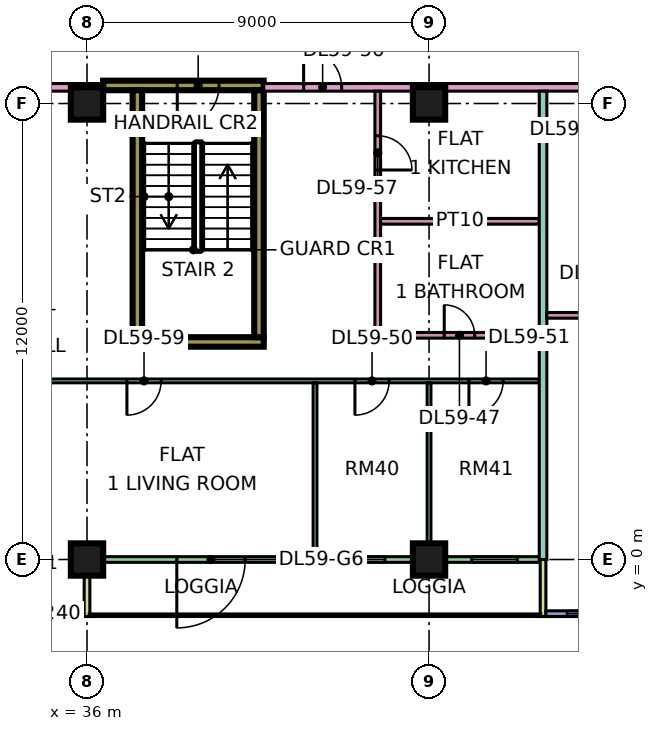
"""IFC4 building model, lengths in metres.
Left out: names, types, materials, properties, quantities, classifications, styles, units other than length and angle.
Written with IfcOpenShell. Run it as: python <this file> out.ifc"""

import sys

from ifc_helpers import new_model, si_unit, direction, frame, frame_2d, origin, origin_2d, place, context, subcontext, project, spatial, rectangle, extrude, element, fill, save


model = new_model("IFC4")
c1 = context("Model", 3, precision=1e-05, world=origin(), true_north=direction((0.0, 1.0)))
c2 = subcontext(c1, "Body", "Model", "MODEL_VIEW")
j1 = project(units=[si_unit("LENGTHUNIT", "METRE"), si_unit("PLANEANGLEUNIT", "RADIAN")], contexts=[c1])
p1 = place(None, origin())
s1 = spatial("IfcSite", under=j1, at=p1, CompositionType="ELEMENT")
p2 = place(p1, origin())
s2 = spatial("IfcBuilding", under=s1, at=p2, CompositionType="ELEMENT")
p3 = place(p2, frame((0.0, 0.0, 249.15)))
s3 = spatial("IfcBuildingStorey", under=s2, at=p3, CompositionType="ELEMENT", Elevation=249.15)
for number, where, z_axis, x_axis in (
    (1, (36.0, 0.0, 0.0), (0.0, 0.0, 1.0), (1.0, 0.0, 0.0)),
    (2, (36.0, 12.0, 0.0), (0.0, 0.0, 1.0), (1.0, 0.0, 0.0)),
    (3, (45.0, 0.0, 0.0), (0.0, 0.0, 1.0), (1.0, 0.0, 0.0)),
    (4, (45.0, 12.0, 0.0), (0.0, 0.0, 1.0), (1.0, 0.0, 0.0)),
):
    element("IfcColumn", number, at=place(p3, frame(where, z_axis=z_axis, x_axis=x_axis)), inside=s3, PredefinedType="COLUMN", context=c2, shape_type="SweptSolid", body=[
        extrude(rectangle(XDim=0.85, YDim=0.85, at=origin_2d()), origin(), (0.0, 0.0, 1.0), 3.75),
    ])
p4 = place(p3, frame((37.2, 5.725, 0.0), z_axis=(0.0, 0.0, 1.0), x_axis=(1.0, 0.0, 0.0)))
e5 = element("IfcWall", 5, at=p4, inside=s3, PredefinedType="SHEAR", context=c2, shape_type="SweptSolid", body=[
    extrude(rectangle(XDim=3.45, YDim=0.25, at=frame_2d((1.725, 0.0))), origin(), (0.0, 0.0, 1.0), 3.75),
])
p5 = place(p3, frame((36.425, 12.475, 0.0), z_axis=(0.0, 0.0, 1.0), x_axis=(1.0, 0.0, 0.0)))
e6 = element("IfcWall", 6, at=p5, inside=s3, PredefinedType="SHEAR", context=c2, shape_type="SweptSolid", body=[
    extrude(rectangle(XDim=4.225, YDim=0.25, at=frame_2d((2.112, 0.0))), origin(), (0.0, 0.0, 1.0), 3.75),
])
p6 = place(p5, frame((1.95, 0.0, 0.0)))
e7 = element("IfcOpeningElement", 7, at=p6, cuts=e6, PredefinedType="OPENING", context=c2, shape_type="SweptSolid", body=[
    extrude(rectangle(XDim=1.1, YDim=2.2, at=frame_2d((0.55, 1.1))), frame((0.0, 0.135, 0.0), z_axis=(0.0, -1.0, 0.0), x_axis=(1.0, 0.0, 0.0)), (0.0, 0.0, 1.0), 0.27),
])
for number, where, z_axis, x_axis in (
    (8, (37.325, 5.85, 0.0), (0.0, 0.0, 1.0), (0.0, 1.0, 0.0)),
    (9, (40.525, 5.85, 0.0), (0.0, 0.0, 1.0), (0.0, 1.0, 0.0)),
):
    element("IfcWall", number, at=place(p3, frame(where, z_axis=z_axis, x_axis=x_axis)), inside=s3, PredefinedType="SHEAR", context=c2, shape_type="SweptSolid", body=[
        extrude(rectangle(XDim=6.5, YDim=0.25, at=frame_2d((3.25, 0.0))), origin(), (0.0, 0.0, 1.0), 3.75),
    ])
p7 = place(p3, frame((24.075, -1.425, 0.0), z_axis=(0.0, 0.0, 1.0), x_axis=(1.0, 0.0, 0.0)))
e10 = element("IfcWall", 10, at=p7, inside=s3, PredefinedType="SOLIDWALL", context=c2, shape_type="SweptSolid", body=[
    extrude(rectangle(XDim=11.85, YDim=0.15, at=frame_2d((5.925, 0.0))), origin(), (0.0, 0.0, 1.0), 3.35),
])
p8 = place(p7, frame((1.462, 0.0, 0.45)))
e11 = element("IfcOpeningElement", 11, at=p8, cuts=e10, PredefinedType="OPENING", context=c2, shape_type="SweptSolid", body=[
    extrude(rectangle(XDim=3.0, YDim=2.4, at=frame_2d((1.5, 1.2))), frame((0.0, 0.085, 0.0), z_axis=(0.0, -1.0, 0.0), x_axis=(1.0, 0.0, 0.0)), (0.0, 0.0, 1.0), 0.17),
])
p9 = place(p7, frame((6.525, 0.0, 0.45)))
e12 = element("IfcOpeningElement", 12, at=p9, cuts=e10, PredefinedType="OPENING", context=c2, shape_type="SweptSolid", body=[
    extrude(rectangle(XDim=1.8, YDim=2.4, at=frame_2d((0.9, 1.2))), frame((0.0, 0.085, 0.0), z_axis=(0.0, -1.0, 0.0), x_axis=(1.0, 0.0, 0.0)), (0.0, 0.0, 1.0), 0.17),
])
p10 = place(p7, frame((9.488, 0.0, 0.45)))
e13 = element("IfcOpeningElement", 13, at=p10, cuts=e10, PredefinedType="OPENING", context=c2, shape_type="SweptSolid", body=[
    extrude(rectangle(XDim=1.8, YDim=2.4, at=frame_2d((0.9, 1.2))), frame((0.0, 0.085, 0.0), z_axis=(0.0, -1.0, 0.0), x_axis=(1.0, 0.0, 0.0)), (0.0, 0.0, 1.0), 0.17),
])
p11 = place(p3, frame((36.075, 0.0, 0.0), z_axis=(0.0, 0.0, 1.0), x_axis=(1.0, 0.0, 0.0)))
e14 = element("IfcWall", 14, at=p11, inside=s3, PredefinedType="SOLIDWALL", context=c2, shape_type="SweptSolid", body=[
    extrude(rectangle(XDim=11.85, YDim=0.15, at=frame_2d((5.925, 0.0))), origin(), (0.0, 0.0, 1.0), 3.35),
])
p12 = place(p11, frame((2.288, 0.0, 0.0)))
e15 = element("IfcOpeningElement", 15, at=p12, cuts=e14, PredefinedType="OPENING", context=c2, shape_type="SweptSolid", body=[
    extrude(rectangle(XDim=1.8, YDim=2.4, at=frame_2d((0.9, 1.2))), frame((0.0, 0.085, 0.0), z_axis=(0.0, -1.0, 0.0), x_axis=(1.0, 0.0, 0.0)), (0.0, 0.0, 1.0), 0.17),
])
p13 = place(p11, frame((6.562, 0.0, 0.45)))
e16 = element("IfcOpeningElement", 16, at=p13, cuts=e14, PredefinedType="OPENING", context=c2, shape_type="SweptSolid", body=[
    extrude(rectangle(XDim=1.2, YDim=2.4, at=frame_2d((0.6, 1.2))), frame((0.0, 0.085, 0.0), z_axis=(0.0, -1.0, 0.0), x_axis=(1.0, 0.0, 0.0)), (0.0, 0.0, 1.0), 0.17),
])
p14 = place(p11, frame((10.05, 0.0, 0.45)))
e17 = element("IfcOpeningElement", 17, at=p14, cuts=e14, PredefinedType="OPENING", context=c2, shape_type="SweptSolid", body=[
    extrude(rectangle(XDim=1.2, YDim=2.4, at=frame_2d((0.6, 1.2))), frame((0.0, 0.085, 0.0), z_axis=(0.0, -1.0, 0.0), x_axis=(1.0, 0.0, 0.0)), (0.0, 0.0, 1.0), 0.17),
])
for number, where, z_axis, x_axis in (
    (18, (36.0, -1.5, 0.0), (0.0, 0.0, 1.0), (0.0, 1.0, 0.0)),
    (19, (48.0, -1.5, 0.0), (0.0, 0.0, 1.0), (0.0, 1.0, 0.0)),
):
    element("IfcWall", number, at=place(p3, frame(where, z_axis=z_axis, x_axis=x_axis)), inside=s3, PredefinedType="SOLIDWALL", context=c2, shape_type="SweptSolid", body=[
        extrude(rectangle(XDim=1.5, YDim=0.15, at=frame_2d((0.75, 0.0))), origin(), (0.0, 0.0, 1.0), 3.35),
    ])
p15 = place(p3, frame((48.075, -1.425, 0.0), z_axis=(0.0, 0.0, 1.0), x_axis=(1.0, 0.0, 0.0)))
e20 = element("IfcWall", 20, at=p15, inside=s3, PredefinedType="SOLIDWALL", context=c2, shape_type="SweptSolid", body=[
    extrude(rectangle(XDim=13.425, YDim=0.15, at=frame_2d((6.712, 0.0))), origin(), (0.0, 0.0, 1.0), 3.35),
])
p16 = place(p15, frame((0.562, 0.0, 0.45)))
e21 = element("IfcOpeningElement", 21, at=p16, cuts=e20, PredefinedType="OPENING", context=c2, shape_type="SweptSolid", body=[
    extrude(rectangle(XDim=1.8, YDim=2.4, at=frame_2d((0.9, 1.2))), frame((0.0, 0.085, 0.0), z_axis=(0.0, -1.0, 0.0), x_axis=(1.0, 0.0, 0.0)), (0.0, 0.0, 1.0), 0.17),
])
p17 = place(p15, frame((4.425, 0.0, 0.45)))
e22 = element("IfcOpeningElement", 22, at=p17, cuts=e20, PredefinedType="OPENING", context=c2, shape_type="SweptSolid", body=[
    extrude(rectangle(XDim=3.0, YDim=2.4, at=frame_2d((1.5, 1.2))), frame((0.0, 0.085, 0.0), z_axis=(0.0, -1.0, 0.0), x_axis=(1.0, 0.0, 0.0)), (0.0, 0.0, 1.0), 0.17),
])
p18 = place(p15, frame((9.375, 0.0, 0.45)))
e23 = element("IfcOpeningElement", 23, at=p18, cuts=e20, PredefinedType="OPENING", context=c2, shape_type="SweptSolid", body=[
    extrude(rectangle(XDim=3.6, YDim=2.4, at=frame_2d((1.8, 1.2))), frame((0.0, 0.085, 0.0), z_axis=(0.0, -1.0, 0.0), x_axis=(1.0, 0.0, 0.0)), (0.0, 0.0, 1.0), 0.17),
])
p19 = place(p3, frame((33.05, 4.7, 0.0), z_axis=(0.0, 0.0, 1.0), x_axis=(1.0, 0.0, 0.0)))
e24 = element("IfcWall", 24, at=p19, inside=s3, PredefinedType="PARTITIONING", context=c2, shape_type="SweptSolid", body=[
    extrude(rectangle(XDim=14.85, YDim=0.1, at=frame_2d((7.425, 0.0))), origin(), (0.0, 0.0, 1.0), 3.35),
])
p20 = place(p19, frame((10.0, 0.0, 0.0)))
e25 = element("IfcOpeningElement", 25, at=p20, cuts=e24, PredefinedType="OPENING", context=c2, shape_type="SweptSolid", body=[
    extrude(rectangle(XDim=0.9, YDim=2.1, at=frame_2d((0.45, 1.05))), frame((0.0, 0.06, 0.0), z_axis=(0.0, -1.0, 0.0), x_axis=(1.0, 0.0, 0.0)), (0.0, 0.0, 1.0), 0.12),
])
p21 = place(p19, frame((13.0, 0.0, 0.0)))
e26 = element("IfcOpeningElement", 26, at=p21, cuts=e24, PredefinedType="OPENING", context=c2, shape_type="SweptSolid", body=[
    extrude(rectangle(XDim=0.9, YDim=2.1, at=frame_2d((0.45, 1.05))), frame((0.0, 0.06, 0.0), z_axis=(0.0, -1.0, 0.0), x_axis=(1.0, 0.0, 0.0)), (0.0, 0.0, 1.0), 0.12),
])
p22 = place(p19, frame((4.0, 0.0, 0.0)))
e27 = element("IfcOpeningElement", 27, at=p22, cuts=e24, PredefinedType="OPENING", context=c2, shape_type="SweptSolid", body=[
    extrude(rectangle(XDim=0.9, YDim=2.1, at=frame_2d((0.45, 1.05))), frame((0.0, 0.06, 0.0), z_axis=(0.0, -1.0, 0.0), x_axis=(1.0, 0.0, 0.0)), (0.0, 0.0, 1.0), 0.12),
])
p23 = place(p3, frame((34.0, 12.425, 0.0), z_axis=(0.0, 0.0, 1.0), x_axis=(1.0, 0.0, 0.0)))
e28 = element("IfcWall", 28, at=p23, inside=s3, PredefinedType="PARTITIONING", context=c2, shape_type="SweptSolid", body=[
    extrude(rectangle(XDim=2.426, YDim=0.2, at=frame_2d((1.213, 0.0))), origin(), (0.0, 0.0, 1.0), 3.35),
])
p24 = place(p3, frame((40.65, 12.425, 0.0), z_axis=(0.0, 0.0, 1.0), x_axis=(1.0, 0.0, 0.0)))
e29 = element("IfcWall", 29, at=p24, inside=s3, PredefinedType="PARTITIONING", context=c2, shape_type="SweptSolid", body=[
    extrude(rectangle(XDim=22.276, YDim=0.2, at=frame_2d((11.138, 0.0))), origin(), (0.0, 0.0, 1.0), 3.35),
])
p25 = place(p24, frame((8.7, 0.0, 0.0)))
e30 = element("IfcOpeningElement", 30, at=p25, cuts=e29, PredefinedType="OPENING", context=c2, shape_type="SweptSolid", body=[
    extrude(rectangle(XDim=1.0, YDim=2.1, at=frame_2d((0.5, 1.05))), frame((0.0, 0.11, 0.0), z_axis=(0.0, -1.0, 0.0), x_axis=(1.0, 0.0, 0.0)), (0.0, 0.0, 1.0), 0.22),
])
p26 = place(p24, frame((1.05, 0.0, 0.0)))
e31 = element("IfcOpeningElement", 31, at=p26, cuts=e29, PredefinedType="OPENING", context=c2, shape_type="SweptSolid", body=[
    extrude(rectangle(XDim=1.0, YDim=2.1, at=frame_2d((0.5, 1.05))), frame((0.0, 0.11, 0.0), z_axis=(0.0, -1.0, 0.0), x_axis=(1.0, 0.0, 0.0)), (0.0, 0.0, 1.0), 0.22),
])
p27 = place(p3, frame((42.0, 0.074, 0.0), z_axis=(0.0, 0.0, 1.0), x_axis=(0.0, 1.0, 0.0)))
e32 = element("IfcWall", 32, at=p27, inside=s3, PredefinedType="PARTITIONING", context=c2, shape_type="SweptSolid", body=[
    extrude(rectangle(XDim=4.576, YDim=0.1, at=frame_2d((2.288, 0.0))), origin(), (0.0, 0.0, 1.0), 3.35),
])
p28 = place(p3, frame((43.65, 5.825, 0.0), z_axis=(0.0, 0.0, 1.0), x_axis=(0.0, 1.0, 0.0)))
e33 = element("IfcWall", 33, at=p28, inside=s3, PredefinedType="PARTITIONING", context=c2, shape_type="SweptSolid", body=[
    extrude(rectangle(XDim=6.5, YDim=0.15, at=frame_2d((3.25, 0.0))), origin(), (0.0, 0.0, 1.0), 3.35),
])
p29 = place(p28, frame((4.425, 0.0, 0.0)))
e34 = element("IfcOpeningElement", 34, at=p29, cuts=e33, PredefinedType="OPENING", context=c2, shape_type="SweptSolid", body=[
    extrude(rectangle(XDim=0.9, YDim=2.1, at=frame_2d((0.45, 1.05))), frame((0.0, 0.085, 0.0), z_axis=(0.0, -1.0, 0.0), x_axis=(1.0, 0.0, 0.0)), (0.0, 0.0, 1.0), 0.17),
])
p30 = place(p3, frame((43.725, 5.9, 0.0), z_axis=(0.0, 0.0, 1.0), x_axis=(1.0, 0.0, 0.0)))
e35 = element("IfcWall", 35, at=p30, inside=s3, PredefinedType="PARTITIONING", context=c2, shape_type="SweptSolid", body=[
    extrude(rectangle(XDim=4.175, YDim=0.15, at=frame_2d((2.087, 0.0))), origin(), (0.0, 0.0, 1.0), 3.35),
])
p31 = place(p30, frame((1.675, 0.0, 0.0)))
e36 = element("IfcOpeningElement", 36, at=p31, cuts=e35, PredefinedType="OPENING", context=c2, shape_type="SweptSolid", body=[
    extrude(rectangle(XDim=0.8, YDim=2.1, at=frame_2d((0.4, 1.05))), frame((0.0, 0.085, 0.0), z_axis=(0.0, -1.0, 0.0), x_axis=(1.0, 0.0, 0.0)), (0.0, 0.0, 1.0), 0.17),
])
p32 = place(p3, frame((43.725, 8.9, 0.0), z_axis=(0.0, 0.0, 1.0), x_axis=(1.0, 0.0, 0.0)))
e37 = element("IfcWall", 37, at=p32, inside=s3, PredefinedType="PARTITIONING", context=c2, shape_type="SweptSolid", body=[
    extrude(rectangle(XDim=4.175, YDim=0.15, at=frame_2d((2.087, 0.0))), origin(), (0.0, 0.0, 1.0), 3.35),
])
p33 = place(p3, frame((45.0, 0.074, 0.0), z_axis=(0.0, 0.0, 1.0), x_axis=(0.0, 1.0, 0.0)))
e38 = element("IfcWall", 38, at=p33, inside=s3, PredefinedType="PARTITIONING", context=c2, shape_type="SweptSolid", body=[
    extrude(rectangle(XDim=4.576, YDim=0.1, at=frame_2d((2.288, 0.0))), origin(), (0.0, 0.0, 1.0), 3.35),
])
p34 = place(p3, frame((48.0, 0.0, 0.0), z_axis=(0.0, 0.0, 1.0), x_axis=(0.0, 1.0, 0.0)))
e39 = element("IfcWall", 39, at=p34, inside=s3, PredefinedType="PARTITIONING", context=c2, shape_type="SweptSolid", body=[
    extrude(rectangle(XDim=12.325, YDim=0.2, at=frame_2d((6.163, 0.0))), origin(), (0.0, 0.0, 1.0), 3.35),
])
p35 = place(p3, frame((48.1, 6.425, 0.0), z_axis=(0.0, 0.0, 1.0), x_axis=(1.0, 0.0, 0.0)))
e40 = element("IfcWall", 40, at=p35, inside=s3, PredefinedType="PARTITIONING", context=c2, shape_type="SweptSolid", body=[
    extrude(rectangle(XDim=8.95, YDim=0.15, at=frame_2d((4.475, 0.0))), origin(), (0.0, 0.0, 1.0), 3.35),
])
p36 = place(p35, frame((0.95, 0.0, 0.0)))
e41 = element("IfcOpeningElement", 41, at=p36, cuts=e40, PredefinedType="OPENING", context=c2, shape_type="SweptSolid", body=[
    extrude(rectangle(XDim=0.9, YDim=2.1, at=frame_2d((0.45, 1.05))), frame((0.0, 0.085, 0.0), z_axis=(0.0, -1.0, 0.0), x_axis=(1.0, 0.0, 0.0)), (0.0, 0.0, 1.0), 0.17),
])
p37 = place(p35, frame((6.95, 0.0, 0.0)))
e42 = element("IfcOpeningElement", 42, at=p37, cuts=e40, PredefinedType="OPENING", context=c2, shape_type="SweptSolid", body=[
    extrude(rectangle(XDim=0.9, YDim=2.1, at=frame_2d((0.45, 1.05))), frame((0.0, 0.085, 0.0), z_axis=(0.0, -1.0, 0.0), x_axis=(1.0, 0.0, 0.0)), (0.0, 0.0, 1.0), 0.17),
])
p38 = place(p10, origin())
e43 = element("IfcWindow", 43, at=p38, inside=s3, PartitioningType="SINGLE_PANEL", PredefinedType="WINDOW", context=c2, shape_type="SweptSolid", body=[
    extrude(rectangle(XDim=1.8, YDim=2.4, at=frame_2d((0.9, 1.2))), frame((0.0, 0.03, 0.0), z_axis=(0.0, -1.0, 0.0), x_axis=(1.0, 0.0, 0.0)), (0.0, 0.0, 1.0), 0.06),
])
fill(e13, e43)
p39 = place(p12, frame((1.8, 0.0, 0.0), z_axis=(0.0, 0.0, 1.0), x_axis=(-1.0, 0.0, 0.0)))
e44 = element("IfcDoor", 44, at=p39, inside=s3, OperationType="DOUBLE_DOOR_SINGLE_SWING", PredefinedType="DOOR", context=c2, shape_type="SweptSolid", body=[
    extrude(rectangle(XDim=1.8, YDim=2.4, at=frame_2d((0.9, 1.2))), frame((0.0, 0.025, 0.0), z_axis=(0.0, -1.0, 0.0), x_axis=(1.0, 0.0, 0.0)), (0.0, 0.0, 1.0), 0.05),
])
fill(e15, e44)
p40 = place(p13, origin())
e45 = element("IfcWindow", 45, at=p40, inside=s3, PartitioningType="SINGLE_PANEL", PredefinedType="WINDOW", context=c2, shape_type="SweptSolid", body=[
    extrude(rectangle(XDim=1.2, YDim=2.4, at=frame_2d((0.6, 1.2))), frame((0.0, 0.03, 0.0), z_axis=(0.0, -1.0, 0.0), x_axis=(1.0, 0.0, 0.0)), (0.0, 0.0, 1.0), 0.06),
])
fill(e16, e45)
p41 = place(p14, origin())
e46 = element("IfcWindow", 46, at=p41, inside=s3, PartitioningType="SINGLE_PANEL", PredefinedType="WINDOW", context=c2, shape_type="SweptSolid", body=[
    extrude(rectangle(XDim=1.2, YDim=2.4, at=frame_2d((0.6, 1.2))), frame((0.0, 0.03, 0.0), z_axis=(0.0, -1.0, 0.0), x_axis=(1.0, 0.0, 0.0)), (0.0, 0.0, 1.0), 0.06),
])
fill(e17, e46)
p42 = place(p16, origin())
e47 = element("IfcWindow", 47, at=p42, inside=s3, PartitioningType="SINGLE_PANEL", PredefinedType="WINDOW", context=c2, shape_type="SweptSolid", body=[
    extrude(rectangle(XDim=1.8, YDim=2.4, at=frame_2d((0.9, 1.2))), frame((0.0, 0.03, 0.0), z_axis=(0.0, -1.0, 0.0), x_axis=(1.0, 0.0, 0.0)), (0.0, 0.0, 1.0), 0.06),
])
fill(e21, e47)
p43 = place(p6, frame((1.1, 0.0, 0.0), z_axis=(0.0, 0.0, 1.0), x_axis=(-1.0, 0.0, 0.0)))
e48 = element("IfcDoor", 48, at=p43, inside=s3, OperationType="SINGLE_SWING_LEFT", PredefinedType="DOOR", context=c2, shape_type="SweptSolid", body=[
    extrude(rectangle(XDim=1.1, YDim=2.2, at=frame_2d((0.55, 1.1))), frame((0.0, 0.025, 0.0), z_axis=(0.0, -1.0, 0.0), x_axis=(1.0, 0.0, 0.0)), (0.0, 0.0, 1.0), 0.05),
])
fill(e7, e48)
p44 = place(p31, origin())
e49 = element("IfcDoor", 49, at=p44, inside=s3, OperationType="SINGLE_SWING_LEFT", PredefinedType="DOOR", context=c2, shape_type="SweptSolid", body=[
    extrude(rectangle(XDim=0.8, YDim=2.1, at=frame_2d((0.4, 1.05))), frame((0.0, 0.025, 0.0), z_axis=(0.0, -1.0, 0.0), x_axis=(1.0, 0.0, 0.0)), (0.0, 0.0, 1.0), 0.05),
])
fill(e36, e49)
p45 = place(p20, frame((0.9, 0.0, 0.0), z_axis=(0.0, 0.0, 1.0), x_axis=(-1.0, 0.0, 0.0)))
e50 = element("IfcDoor", 50, at=p45, inside=s3, OperationType="SINGLE_SWING_LEFT", PredefinedType="DOOR", context=c2, shape_type="SweptSolid", body=[
    extrude(rectangle(XDim=0.9, YDim=2.1, at=frame_2d((0.45, 1.05))), frame((0.0, 0.025, 0.0), z_axis=(0.0, -1.0, 0.0), x_axis=(1.0, 0.0, 0.0)), (0.0, 0.0, 1.0), 0.05),
])
fill(e25, e50)
p46 = place(p21, frame((0.9, 0.0, 0.0), z_axis=(0.0, 0.0, 1.0), x_axis=(-1.0, 0.0, 0.0)))
e51 = element("IfcDoor", 51, at=p46, inside=s3, OperationType="SINGLE_SWING_LEFT", PredefinedType="DOOR", context=c2, shape_type="SweptSolid", body=[
    extrude(rectangle(XDim=0.9, YDim=2.1, at=frame_2d((0.45, 1.05))), frame((0.0, 0.025, 0.0), z_axis=(0.0, -1.0, 0.0), x_axis=(1.0, 0.0, 0.0)), (0.0, 0.0, 1.0), 0.05),
])
fill(e26, e51)
p47 = place(p26, origin())
e52 = element("IfcDoor", 52, at=p47, inside=s3, OperationType="SINGLE_SWING_LEFT", PredefinedType="DOOR", context=c2, shape_type="SweptSolid", body=[
    extrude(rectangle(XDim=1.0, YDim=2.1, at=frame_2d((0.5, 1.05))), frame((0.0, 0.025, 0.0), z_axis=(0.0, -1.0, 0.0), x_axis=(1.0, 0.0, 0.0)), (0.0, 0.0, 1.0), 0.05),
])
fill(e31, e52)
p48 = place(p29, frame((0.9, 0.0, 0.0), z_axis=(0.0, 0.0, 1.0), x_axis=(-1.0, 0.0, 0.0)))
e53 = element("IfcDoor", 53, at=p48, inside=s3, OperationType="SINGLE_SWING_LEFT", PredefinedType="DOOR", context=c2, shape_type="SweptSolid", body=[
    extrude(rectangle(XDim=0.9, YDim=2.1, at=frame_2d((0.45, 1.05))), frame((0.0, 0.025, 0.0), z_axis=(0.0, -1.0, 0.0), x_axis=(1.0, 0.0, 0.0)), (0.0, 0.0, 1.0), 0.05),
])
fill(e34, e53)
p49 = place(p22, frame((0.9, 0.0, 0.0), z_axis=(0.0, 0.0, 1.0), x_axis=(-1.0, 0.0, 0.0)))
e54 = element("IfcDoor", 54, at=p49, inside=s3, OperationType="SINGLE_SWING_LEFT", PredefinedType="DOOR", context=c2, shape_type="SweptSolid", body=[
    extrude(rectangle(XDim=0.9, YDim=2.1, at=frame_2d((0.45, 1.05))), frame((0.0, 0.025, 0.0), z_axis=(0.0, -1.0, 0.0), x_axis=(1.0, 0.0, 0.0)), (0.0, 0.0, 1.0), 0.05),
])
fill(e27, e54)
save(model, sys.argv[1])
